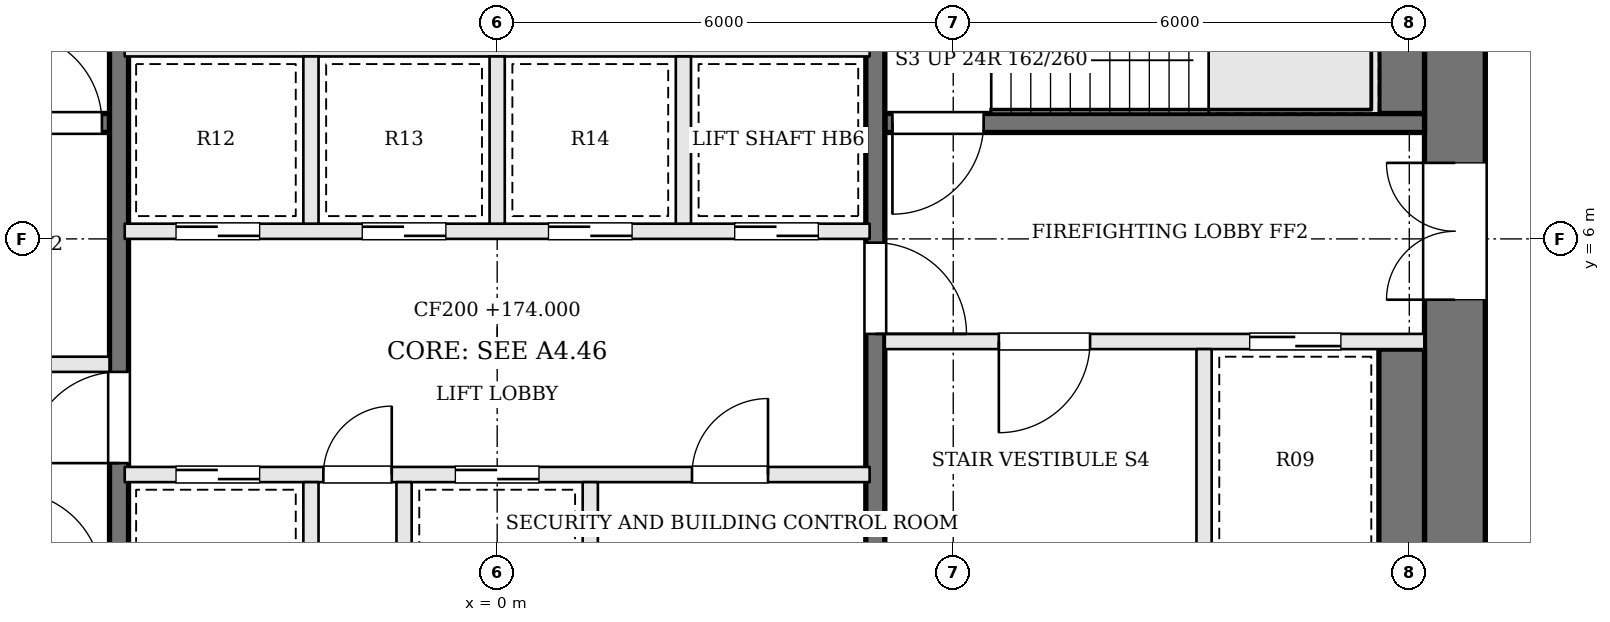
"""IFC4 building model, lengths in metres.
Left out: names, types, materials, properties, quantities, classifications, styles, units other than length and angle.
Written with IfcOpenShell. Run it as: python <this file> out.ifc"""

import sys

from ifc_helpers import new_model, si_unit, direction, frame, frame_2d, origin, place, context, subcontext, project, spatial, rectangle, extrude, element, fill, save


model = new_model("IFC4")
c1 = context("Model", 3, precision=1e-05, world=origin(), true_north=direction((0.0, 1.0)))
c2 = subcontext(c1, "Body", "Model", "MODEL_VIEW")
j1 = project(units=[si_unit("LENGTHUNIT", "METRE"), si_unit("PLANEANGLEUNIT", "RADIAN")], contexts=[c1])
p1 = place(None, origin())
s1 = spatial("IfcSite", under=j1, at=p1, CompositionType="ELEMENT")
p2 = place(p1, origin())
s2 = spatial("IfcBuilding", under=s1, at=p2, CompositionType="ELEMENT")
p3 = place(p2, frame((0.0, 0.0, 174.0)))
s3 = spatial("IfcBuildingStorey", under=s2, at=p3, CompositionType="ELEMENT", Elevation=174.0)
p4 = place(p3, frame((12.6, -2.2, 0.0), z_axis=(0.0, 0.0, 1.0), x_axis=(0.0, 1.0, 0.0)))
e1 = element("IfcWall", 1, at=p4, inside=s3, PredefinedType="SHEAR", context=c2, shape_type="SweptSolid", body=[
    extrude(rectangle(XDim=13.4, YDim=0.8, at=frame_2d((6.7, 0.0))), origin(), (0.0, 0.0, 1.0), 3.9),
])
p5 = place(p4, frame((7.4, 0.0, 0.0)))
e2 = element("IfcOpeningElement", 2, at=p5, cuts=e1, PredefinedType="OPENING", context=c2, shape_type="SweptSolid", body=[
    extrude(rectangle(XDim=1.8, YDim=2.1, at=frame_2d((0.9, 1.05))), frame((0.0, 0.41, 0.0), z_axis=(0.0, -1.0, 0.0), x_axis=(1.0, 0.0, 0.0)), (0.0, 0.0, 1.0), 0.82),
])
p6 = place(p3, frame((12.2, 7.525, 0.0), z_axis=(0.0, 0.0, 1.0), x_axis=(-1.0, 0.0, 0.0)))
e3 = element("IfcWall", 3, at=p6, inside=s3, PredefinedType="SOLIDWALL", context=c2, shape_type="SweptSolid", body=[
    extrude(rectangle(XDim=7.1, YDim=0.25, at=frame_2d((3.55, 0.0))), origin(), (0.0, 0.0, 1.0), 3.7),
])
p7 = place(p6, frame((5.8, 0.0, 0.0)))
e4 = element("IfcOpeningElement", 4, at=p7, cuts=e3, PredefinedType="OPENING", context=c2, shape_type="SweptSolid", body=[
    extrude(rectangle(XDim=1.2, YDim=2.1, at=frame_2d((0.6, 1.05))), frame((0.0, 0.135, 0.0), z_axis=(0.0, -1.0, 0.0), x_axis=(1.0, 0.0, 0.0)), (0.0, 0.0, 1.0), 0.27),
])
p8 = place(p3, frame((-12.2, 4.35, 0.0), z_axis=(0.0, 0.0, 1.0), x_axis=(1.0, 0.0, 0.0)))
e5 = element("IfcWall", 5, at=p8, inside=s3, PredefinedType="SOLIDWALL", context=c2, shape_type="SweptSolid", body=[
    extrude(rectangle(XDim=7.1, YDim=0.2, at=frame_2d((3.55, 0.0))), origin(), (0.0, 0.0, 1.0), 3.7),
])
p9 = place(p8, frame((4.4, 0.0, 0.0)))
e6 = element("IfcOpeningElement", 6, at=p9, cuts=e5, PredefinedType="OPENING", context=c2, shape_type="SweptSolid", body=[
    extrude(rectangle(XDim=1.2, YDim=2.1, at=frame_2d((0.6, 1.05))), frame((0.0, 0.11, 0.0), z_axis=(0.0, -1.0, 0.0), x_axis=(1.0, 0.0, 0.0)), (0.0, 0.0, 1.0), 0.22),
])
p10 = place(p8, frame((1.1, 0.0, 0.0)))
e7 = element("IfcOpeningElement", 7, at=p10, cuts=e5, PredefinedType="OPENING", context=c2, shape_type="SweptSolid", body=[
    extrude(rectangle(XDim=1.2, YDim=2.1, at=frame_2d((0.6, 1.05))), frame((0.0, 0.11, 0.0), z_axis=(0.0, -1.0, 0.0), x_axis=(1.0, 0.0, 0.0)), (0.0, 0.0, 1.0), 0.22),
])
p11 = place(p3, frame((12.2, 4.65, 0.0), z_axis=(0.0, 0.0, 1.0), x_axis=(-1.0, 0.0, 0.0)))
e8 = element("IfcWall", 8, at=p11, inside=s3, PredefinedType="SOLIDWALL", context=c2, shape_type="SweptSolid", body=[
    extrude(rectangle(XDim=7.1, YDim=0.2, at=frame_2d((3.55, 0.0))), origin(), (0.0, 0.0, 1.0), 3.7),
])
p12 = place(p11, frame((4.4, 0.0, 0.0)))
e9 = element("IfcOpeningElement", 9, at=p12, cuts=e8, PredefinedType="OPENING", context=c2, shape_type="SweptSolid", body=[
    extrude(rectangle(XDim=1.2, YDim=2.1, at=frame_2d((0.6, 1.05))), frame((0.0, 0.11, 0.0), z_axis=(0.0, -1.0, 0.0), x_axis=(1.0, 0.0, 0.0)), (0.0, 0.0, 1.0), 0.22),
])
p13 = place(p11, frame((1.1, 0.0, 0.0)))
e10 = element("IfcOpeningElement", 10, at=p13, cuts=e8, PredefinedType="OPENING", context=c2, shape_type="SweptSolid", body=[
    extrude(rectangle(XDim=1.2, YDim=2.1, at=frame_2d((0.6, 1.05))), frame((0.0, 0.11, 0.0), z_axis=(0.0, -1.0, 0.0), x_axis=(1.0, 0.0, 0.0)), (0.0, 0.0, 1.0), 0.22),
])
p14 = place(p3, frame((-12.2, 7.525, 0.0), z_axis=(0.0, 0.0, 1.0), x_axis=(1.0, 0.0, 0.0)))
e11 = element("IfcWall", 11, at=p14, inside=s3, PredefinedType="SOLIDWALL", context=c2, shape_type="SweptSolid", body=[
    extrude(rectangle(XDim=7.1, YDim=0.25, at=frame_2d((3.55, 0.0))), origin(), (0.0, 0.0, 1.0), 3.7),
])
p15 = place(p14, frame((5.8, 0.0, 0.0)))
e12 = element("IfcOpeningElement", 12, at=p15, cuts=e11, PredefinedType="OPENING", context=c2, shape_type="SweptSolid", body=[
    extrude(rectangle(XDim=1.2, YDim=2.1, at=frame_2d((0.6, 1.05))), frame((0.0, 0.135, 0.0), z_axis=(0.0, -1.0, 0.0), x_axis=(1.0, 0.0, 0.0)), (0.0, 0.0, 1.0), 0.27),
])
p16 = place(p3, frame((9.3, 4.55, 0.0), z_axis=(0.0, 0.0, 1.0), x_axis=(0.0, -1.0, 0.0)))
e13 = element("IfcWall", 13, at=p16, inside=s3, PredefinedType="SOLIDWALL", context=c2, shape_type="SweptSolid", body=[
    extrude(rectangle(XDim=3.0, YDim=0.2, at=frame_2d((1.5, 0.0))), origin(), (0.0, 0.0, 1.0), 3.7),
])
p17 = place(p3, frame((-4.975, -2.2, 0.0), z_axis=(0.0, 0.0, 1.0), x_axis=(0.0, 1.0, 0.0)))
e14 = element("IfcWall", 14, at=p17, inside=s3, PredefinedType="SOLIDWALL", context=c2, shape_type="SweptSolid", body=[
    extrude(rectangle(XDim=13.4, YDim=0.25, at=frame_2d((6.7, 0.0))), origin(), (0.0, 0.0, 1.0), 3.7),
])
p18 = place(p17, frame((5.25, 0.0, 0.0)))
e15 = element("IfcOpeningElement", 15, at=p18, cuts=e14, PredefinedType="OPENING", context=c2, shape_type="SweptSolid", body=[
    extrude(rectangle(XDim=1.2, YDim=2.1, at=frame_2d((0.6, 1.05))), frame((0.0, 0.135, 0.0), z_axis=(0.0, -1.0, 0.0), x_axis=(1.0, 0.0, 0.0)), (0.0, 0.0, 1.0), 0.27),
])
p19 = place(p3, frame((4.975, 11.2, 0.0), z_axis=(0.0, 0.0, 1.0), x_axis=(0.0, -1.0, 0.0)))
e16 = element("IfcWall", 16, at=p19, inside=s3, PredefinedType="SOLIDWALL", context=c2, shape_type="SweptSolid", body=[
    extrude(rectangle(XDim=13.4, YDim=0.25, at=frame_2d((6.7, 0.0))), origin(), (0.0, 0.0, 1.0), 3.7),
])
p20 = place(p19, frame((5.25, 0.0, 0.0)))
e17 = element("IfcOpeningElement", 17, at=p20, cuts=e16, PredefinedType="OPENING", context=c2, shape_type="SweptSolid", body=[
    extrude(rectangle(XDim=1.2, YDim=2.1, at=frame_2d((0.6, 1.05))), frame((0.0, 0.135, 0.0), z_axis=(0.0, -1.0, 0.0), x_axis=(1.0, 0.0, 0.0)), (0.0, 0.0, 1.0), 0.27),
])
p21 = place(p3, frame((11.9, 10.6, 0.0), z_axis=(0.0, 0.0, 1.0), x_axis=(0.0, -1.0, 0.0)))
e18 = element("IfcWall", 18, at=p21, inside=s3, PredefinedType="SOLIDWALL", context=c2, shape_type="SweptSolid", body=[
    extrude(rectangle(XDim=2.95, YDim=0.6, at=frame_2d((1.475, 0.0))), origin(), (0.0, 0.0, 1.0), 3.7),
])
p22 = place(p3, frame((11.9, 4.55, 0.0), z_axis=(0.0, 0.0, 1.0), x_axis=(0.0, -1.0, 0.0)))
e19 = element("IfcWall", 19, at=p22, inside=s3, PredefinedType="SOLIDWALL", context=c2, shape_type="SweptSolid", body=[
    extrude(rectangle(XDim=3.0, YDim=0.6, at=frame_2d((1.5, 0.0))), origin(), (0.0, 0.0, 1.0), 3.7),
])
p23 = place(p3, frame((-4.9, 2.9, 0.0), z_axis=(0.0, 0.0, 1.0), x_axis=(1.0, 0.0, 0.0)))
e20 = element("IfcWall", 20, at=p23, inside=s3, PredefinedType="SOLIDWALL", context=c2, shape_type="SweptSolid", body=[
    extrude(rectangle(XDim=9.8, YDim=0.2, at=frame_2d((4.9, 0.0))), origin(), (0.0, 0.0, 1.0), 3.7),
])
p24 = place(p23, frame((0.675, 0.0, 0.0)))
e21 = element("IfcOpeningElement", 21, at=p24, cuts=e20, PredefinedType="OPENING", context=c2, shape_type="SweptSolid", body=[
    extrude(rectangle(XDim=1.1, YDim=2.1, at=frame_2d((0.55, 1.05))), frame((0.0, 0.11, 0.0), z_axis=(0.0, -1.0, 0.0), x_axis=(1.0, 0.0, 0.0)), (0.0, 0.0, 1.0), 0.22),
])
p25 = place(p23, frame((2.613, 0.0, 0.0)))
e22 = element("IfcOpeningElement", 22, at=p25, cuts=e20, PredefinedType="OPENING", context=c2, shape_type="SweptSolid", body=[
    extrude(rectangle(XDim=0.9, YDim=2.1, at=frame_2d((0.45, 1.05))), frame((0.0, 0.11, 0.0), z_axis=(0.0, -1.0, 0.0), x_axis=(1.0, 0.0, 0.0)), (0.0, 0.0, 1.0), 0.22),
])
p26 = place(p23, frame((4.35, 0.0, 0.0)))
e23 = element("IfcOpeningElement", 23, at=p26, cuts=e20, PredefinedType="OPENING", context=c2, shape_type="SweptSolid", body=[
    extrude(rectangle(XDim=1.1, YDim=2.1, at=frame_2d((0.55, 1.05))), frame((0.0, 0.11, 0.0), z_axis=(0.0, -1.0, 0.0), x_axis=(1.0, 0.0, 0.0)), (0.0, 0.0, 1.0), 0.22),
])
p27 = place(p23, frame((7.463, 0.0, 0.0)))
e24 = element("IfcOpeningElement", 24, at=p27, cuts=e20, PredefinedType="OPENING", context=c2, shape_type="SweptSolid", body=[
    extrude(rectangle(XDim=1.0, YDim=2.1, at=frame_2d((0.5, 1.05))), frame((0.0, 0.11, 0.0), z_axis=(0.0, -1.0, 0.0), x_axis=(1.0, 0.0, 0.0)), (0.0, 0.0, 1.0), 0.22),
])
p28 = place(p3, frame((-4.9, 6.1, 0.0), z_axis=(0.0, 0.0, 1.0), x_axis=(1.0, 0.0, 0.0)))
e25 = element("IfcWall", 25, at=p28, inside=s3, PredefinedType="SOLIDWALL", context=c2, shape_type="SweptSolid", body=[
    extrude(rectangle(XDim=9.8, YDim=0.2, at=frame_2d((4.9, 0.0))), origin(), (0.0, 0.0, 1.0), 3.7),
])
p29 = place(p28, frame((0.675, 0.0, 0.0)))
e26 = element("IfcOpeningElement", 26, at=p29, cuts=e25, PredefinedType="OPENING", context=c2, shape_type="SweptSolid", body=[
    extrude(rectangle(XDim=1.1, YDim=2.1, at=frame_2d((0.55, 1.05))), frame((0.0, 0.11, 0.0), z_axis=(0.0, -1.0, 0.0), x_axis=(1.0, 0.0, 0.0)), (0.0, 0.0, 1.0), 0.22),
])
p30 = place(p28, frame((3.125, 0.0, 0.0)))
e27 = element("IfcOpeningElement", 27, at=p30, cuts=e25, PredefinedType="OPENING", context=c2, shape_type="SweptSolid", body=[
    extrude(rectangle(XDim=1.1, YDim=2.1, at=frame_2d((0.55, 1.05))), frame((0.0, 0.11, 0.0), z_axis=(0.0, -1.0, 0.0), x_axis=(1.0, 0.0, 0.0)), (0.0, 0.0, 1.0), 0.22),
])
p31 = place(p28, frame((5.575, 0.0, 0.0)))
e28 = element("IfcOpeningElement", 28, at=p31, cuts=e25, PredefinedType="OPENING", context=c2, shape_type="SweptSolid", body=[
    extrude(rectangle(XDim=1.1, YDim=2.1, at=frame_2d((0.55, 1.05))), frame((0.0, 0.11, 0.0), z_axis=(0.0, -1.0, 0.0), x_axis=(1.0, 0.0, 0.0)), (0.0, 0.0, 1.0), 0.22),
])
p32 = place(p28, frame((8.025, 0.0, 0.0)))
e29 = element("IfcOpeningElement", 29, at=p32, cuts=e25, PredefinedType="OPENING", context=c2, shape_type="SweptSolid", body=[
    extrude(rectangle(XDim=1.1, YDim=2.1, at=frame_2d((0.55, 1.05))), frame((0.0, 0.11, 0.0), z_axis=(0.0, -1.0, 0.0), x_axis=(1.0, 0.0, 0.0)), (0.0, 0.0, 1.0), 0.22),
])
p33 = place(p3, frame((-4.9, 8.5, 0.0), z_axis=(0.0, 0.0, 1.0), x_axis=(1.0, 0.0, 0.0)))
e30 = element("IfcWall", 30, at=p33, inside=s3, PredefinedType="SOLIDWALL", context=c2, shape_type="SweptSolid", body=[
    extrude(rectangle(XDim=9.8, YDim=0.2, at=frame_2d((4.9, 0.0))), origin(), (0.0, 0.0, 1.0), 3.7),
])
for number, where, z_axis, x_axis in (
    (31, (-2.45, 0.6, 0.0), (0.0, 0.0, 1.0), (0.0, 1.0, 0.0)),
    (32, (-1.225, 0.6, 0.0), (0.0, 0.0, 1.0), (0.0, 1.0, 0.0)),
    (33, (1.225, 0.6, 0.0), (0.0, 0.0, 1.0), (0.0, 1.0, 0.0)),
    (34, (-2.45, 6.2, 0.0), (0.0, 0.0, 1.0), (0.0, 1.0, 0.0)),
    (35, (0.0, 6.2, 0.0), (0.0, 0.0, 1.0), (0.0, 1.0, 0.0)),
    (36, (2.45, 6.2, 0.0), (0.0, 0.0, 1.0), (0.0, 1.0, 0.0)),
):
    element("IfcWall", number, at=place(p3, frame(where, z_axis=z_axis, x_axis=x_axis)), inside=s3, PredefinedType="SOLIDWALL", context=c2, shape_type="SweptSolid", body=[
        extrude(rectangle(XDim=2.2, YDim=0.2, at=frame_2d((1.1, 0.0))), origin(), (0.0, 0.0, 1.0), 3.7),
    ])
p34 = place(p5, origin())
e37 = element("IfcDoor", 37, at=p34, inside=s3, OperationType="DOUBLE_DOOR_SINGLE_SWING", PredefinedType="DOOR", context=c2, shape_type="SweptSolid", body=[
    extrude(rectangle(XDim=1.8, YDim=2.1, at=frame_2d((0.9, 1.05))), frame((0.0, 0.025, 0.0), z_axis=(0.0, -1.0, 0.0), x_axis=(1.0, 0.0, 0.0)), (0.0, 0.0, 1.0), 0.05),
])
fill(e2, e37)
p35 = place(p18, origin())
e38 = element("IfcDoor", 38, at=p35, inside=s3, OperationType="SINGLE_SWING_LEFT", PredefinedType="DOOR", context=c2, shape_type="SweptSolid", body=[
    extrude(rectangle(XDim=1.2, YDim=2.1, at=frame_2d((0.6, 1.05))), frame((0.0, 0.025, 0.0), z_axis=(0.0, -1.0, 0.0), x_axis=(1.0, 0.0, 0.0)), (0.0, 0.0, 1.0), 0.05),
])
fill(e15, e38)
p36 = place(p20, origin())
e39 = element("IfcDoor", 39, at=p36, inside=s3, OperationType="SINGLE_SWING_RIGHT", PredefinedType="DOOR", context=c2, shape_type="SweptSolid", body=[
    extrude(rectangle(XDim=1.2, YDim=2.1, at=frame_2d((0.6, 1.05))), frame((0.0, 0.025, 0.0), z_axis=(0.0, -1.0, 0.0), x_axis=(1.0, 0.0, 0.0)), (0.0, 0.0, 1.0), 0.05),
])
fill(e17, e39)
p37 = place(p12, origin())
e40 = element("IfcDoor", 40, at=p37, inside=s3, OperationType="SINGLE_SWING_RIGHT", PredefinedType="DOOR", context=c2, shape_type="SweptSolid", body=[
    extrude(rectangle(XDim=1.2, YDim=2.1, at=frame_2d((0.6, 1.05))), frame((0.0, 0.025, 0.0), z_axis=(0.0, -1.0, 0.0), x_axis=(1.0, 0.0, 0.0)), (0.0, 0.0, 1.0), 0.05),
])
fill(e9, e40)
p38 = place(p7, origin())
e41 = element("IfcDoor", 41, at=p38, inside=s3, OperationType="SINGLE_SWING_RIGHT", PredefinedType="DOOR", context=c2, shape_type="SweptSolid", body=[
    extrude(rectangle(XDim=1.2, YDim=2.1, at=frame_2d((0.6, 1.05))), frame((0.0, 0.025, 0.0), z_axis=(0.0, -1.0, 0.0), x_axis=(1.0, 0.0, 0.0)), (0.0, 0.0, 1.0), 0.05),
])
fill(e4, e41)
p39 = place(p15, origin())
e42 = element("IfcDoor", 42, at=p39, inside=s3, OperationType="SINGLE_SWING_LEFT", PredefinedType="DOOR", context=c2, shape_type="SweptSolid", body=[
    extrude(rectangle(XDim=1.2, YDim=2.1, at=frame_2d((0.6, 1.05))), frame((0.0, 0.025, 0.0), z_axis=(0.0, -1.0, 0.0), x_axis=(1.0, 0.0, 0.0)), (0.0, 0.0, 1.0), 0.05),
])
fill(e12, e42)
p40 = place(p13, origin())
e43 = element("IfcDoor", 43, at=p40, inside=s3, OperationType="SLIDING_TO_RIGHT", PredefinedType="DOOR", context=c2, shape_type="SweptSolid", body=[
    extrude(rectangle(XDim=1.2, YDim=2.1, at=frame_2d((0.6, 1.05))), frame((0.0, 0.025, 0.0), z_axis=(0.0, -1.0, 0.0), x_axis=(1.0, 0.0, 0.0)), (0.0, 0.0, 1.0), 0.05),
])
fill(e10, e43)
p41 = place(p24, origin())
e44 = element("IfcDoor", 44, at=p41, inside=s3, OperationType="SLIDING_TO_RIGHT", PredefinedType="DOOR", context=c2, shape_type="SweptSolid", body=[
    extrude(rectangle(XDim=1.1, YDim=2.1, at=frame_2d((0.55, 1.05))), frame((0.0, 0.025, 0.0), z_axis=(0.0, -1.0, 0.0), x_axis=(1.0, 0.0, 0.0)), (0.0, 0.0, 1.0), 0.05),
])
fill(e21, e44)
p42 = place(p25, origin())
e45 = element("IfcDoor", 45, at=p42, inside=s3, OperationType="SINGLE_SWING_RIGHT", PredefinedType="DOOR", context=c2, shape_type="SweptSolid", body=[
    extrude(rectangle(XDim=0.9, YDim=2.1, at=frame_2d((0.45, 1.05))), frame((0.0, 0.025, 0.0), z_axis=(0.0, -1.0, 0.0), x_axis=(1.0, 0.0, 0.0)), (0.0, 0.0, 1.0), 0.05),
])
fill(e22, e45)
p43 = place(p26, origin())
e46 = element("IfcDoor", 46, at=p43, inside=s3, OperationType="SLIDING_TO_LEFT", PredefinedType="DOOR", context=c2, shape_type="SweptSolid", body=[
    extrude(rectangle(XDim=1.1, YDim=2.1, at=frame_2d((0.55, 1.05))), frame((0.0, 0.025, 0.0), z_axis=(0.0, -1.0, 0.0), x_axis=(1.0, 0.0, 0.0)), (0.0, 0.0, 1.0), 0.05),
])
fill(e23, e46)
p44 = place(p27, origin())
e47 = element("IfcDoor", 47, at=p44, inside=s3, OperationType="SINGLE_SWING_RIGHT", PredefinedType="DOOR", context=c2, shape_type="SweptSolid", body=[
    extrude(rectangle(XDim=1.0, YDim=2.1, at=frame_2d((0.5, 1.05))), frame((0.0, 0.025, 0.0), z_axis=(0.0, -1.0, 0.0), x_axis=(1.0, 0.0, 0.0)), (0.0, 0.0, 1.0), 0.05),
])
fill(e24, e47)
p45 = place(p29, origin())
e48 = element("IfcDoor", 48, at=p45, inside=s3, OperationType="SLIDING_TO_RIGHT", PredefinedType="DOOR", context=c2, shape_type="SweptSolid", body=[
    extrude(rectangle(XDim=1.1, YDim=2.1, at=frame_2d((0.55, 1.05))), frame((0.0, 0.025, 0.0), z_axis=(0.0, -1.0, 0.0), x_axis=(1.0, 0.0, 0.0)), (0.0, 0.0, 1.0), 0.05),
])
fill(e26, e48)
p46 = place(p30, origin())
e49 = element("IfcDoor", 49, at=p46, inside=s3, OperationType="SLIDING_TO_LEFT", PredefinedType="DOOR", context=c2, shape_type="SweptSolid", body=[
    extrude(rectangle(XDim=1.1, YDim=2.1, at=frame_2d((0.55, 1.05))), frame((0.0, 0.025, 0.0), z_axis=(0.0, -1.0, 0.0), x_axis=(1.0, 0.0, 0.0)), (0.0, 0.0, 1.0), 0.05),
])
fill(e27, e49)
p47 = place(p31, origin())
e50 = element("IfcDoor", 50, at=p47, inside=s3, OperationType="SLIDING_TO_RIGHT", PredefinedType="DOOR", context=c2, shape_type="SweptSolid", body=[
    extrude(rectangle(XDim=1.1, YDim=2.1, at=frame_2d((0.55, 1.05))), frame((0.0, 0.025, 0.0), z_axis=(0.0, -1.0, 0.0), x_axis=(1.0, 0.0, 0.0)), (0.0, 0.0, 1.0), 0.05),
])
fill(e28, e50)
p48 = place(p32, origin())
e51 = element("IfcDoor", 51, at=p48, inside=s3, OperationType="SLIDING_TO_LEFT", PredefinedType="DOOR", context=c2, shape_type="SweptSolid", body=[
    extrude(rectangle(XDim=1.1, YDim=2.1, at=frame_2d((0.55, 1.05))), frame((0.0, 0.025, 0.0), z_axis=(0.0, -1.0, 0.0), x_axis=(1.0, 0.0, 0.0)), (0.0, 0.0, 1.0), 0.05),
])
fill(e29, e51)
save(model, sys.argv[1])
